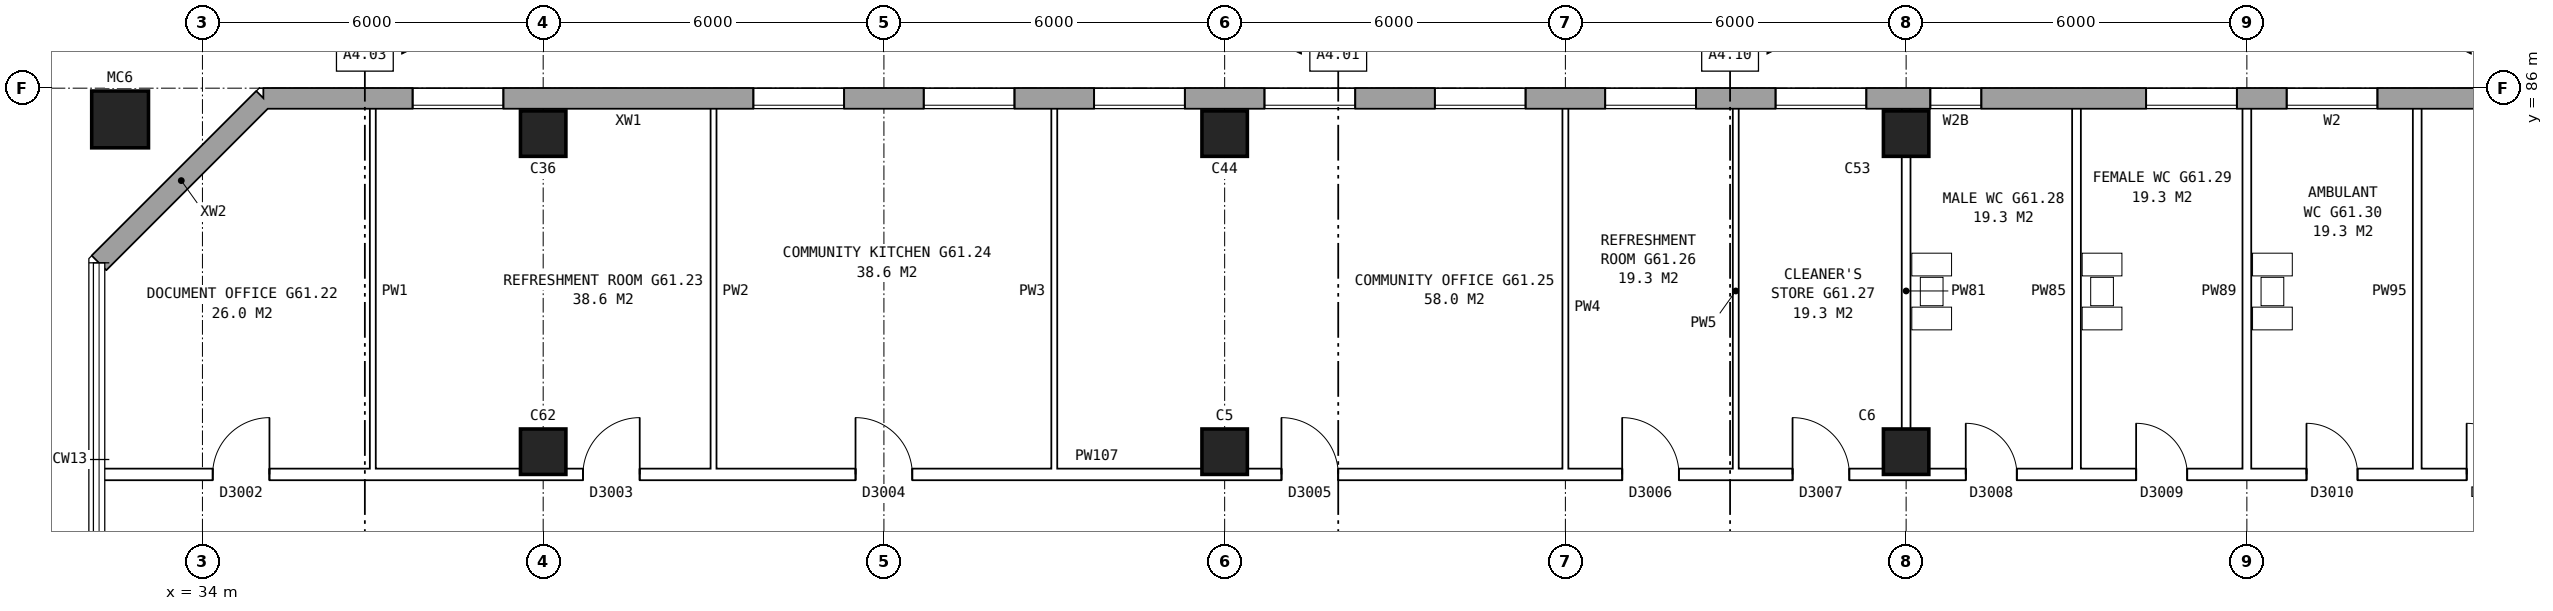
"""IFC4 building model, lengths in metres.
Left out: names, types, materials, properties, quantities, classifications, styles, units other than length and angle.
Written with IfcOpenShell. Run it as: python <this file> out.ifc"""

import sys

from ifc_helpers import new_model, si_unit, direction, frame, frame_2d, origin, origin_2d, place, context, subcontext, project, spatial, rectangle, hollow_rectangle, extrude, element, fill, save


model = new_model("IFC4")
c1 = context("Model", 3, precision=1e-05, world=origin(), true_north=direction((0.0, 1.0)))
c2 = subcontext(c1, "Body", "Model", "MODEL_VIEW")
j1 = project(units=[si_unit("LENGTHUNIT", "METRE"), si_unit("PLANEANGLEUNIT", "RADIAN")], contexts=[c1])
p1 = place(None, origin())
s1 = spatial("IfcSite", under=j1, at=p1, CompositionType="ELEMENT")
p2 = place(p1, origin())
s2 = spatial("IfcBuilding", under=s1, at=p2, CompositionType="ELEMENT")
p3 = place(p2, frame((0.0, 0.0, 215.2)))
s3 = spatial("IfcBuildingStorey", under=s2, at=p3, CompositionType="ELEMENT", Elevation=215.2)
for number, where, z_axis, x_axis in (
    (1, (40.0, 79.6, 0.0), (0.0, 0.0, 1.0), (1.0, 0.0, 0.0)),
    (2, (40.0, 85.2, 0.0), (0.0, 0.0, 1.0), (1.0, 0.0, 0.0)),
    (3, (52.0, 79.6, 0.0), (0.0, 0.0, 1.0), (1.0, 0.0, 0.0)),
    (4, (52.0, 85.2, 0.0), (0.0, 0.0, 1.0), (1.0, 0.0, 0.0)),
    (5, (64.0, 79.6, 0.0), (0.0, 0.0, 1.0), (1.0, 0.0, 0.0)),
    (6, (64.0, 85.2, 0.0), (0.0, 0.0, 1.0), (1.0, 0.0, 0.0)),
):
    element("IfcColumn", number, at=place(p3, frame(where, z_axis=z_axis, x_axis=x_axis)), inside=s3, PredefinedType="COLUMN", context=c2, shape_type="SweptSolid", body=[
        extrude(rectangle(XDim=0.8, YDim=0.8, at=origin_2d()), origin(), (0.0, 0.0, 1.0), 5.6),
    ])
p4 = place(p3, frame((32.55, 85.45, 0.0), z_axis=(0.0, 0.0, 1.0), x_axis=(1.0, 0.0, 0.0)))
e7 = element("IfcColumn", 7, at=p4, inside=s3, PredefinedType="COLUMN", context=c2, shape_type="SweptSolid", body=[
    extrude(hollow_rectangle(XDim=1.0, YDim=1.0, WallThickness=0.055, at=origin_2d()), origin(), (0.0, 0.0, 1.0), 6.2),
])
p5 = place(p3, frame((74.95, 85.82, 0.0), z_axis=(0.0, 0.0, 1.0), x_axis=(-1.0, 0.0, 0.0)))
e8 = element("IfcWall", 8, at=p5, inside=s3, PredefinedType="STANDARD", context=c2, shape_type="SweptSolid", body=[
    extrude(rectangle(XDim=39.875, YDim=0.36, at=frame_2d((19.938, 0.0))), origin(), (0.0, 0.0, 1.0), 5.6),
])
p6 = place(p5, frame((2.65, 0.0, 0.15)))
e9 = element("IfcOpeningElement", 9, at=p6, cuts=e8, PredefinedType="OPENING", context=c2, shape_type="SweptSolid", body=[
    extrude(rectangle(XDim=1.6, YDim=2.4, at=frame_2d((0.8, 1.2))), frame((0.0, 0.19, 0.0), z_axis=(0.0, -1.0, 0.0), x_axis=(1.0, 0.0, 0.0)), (0.0, 0.0, 1.0), 0.38),
])
p7 = place(p5, frame((5.125, 0.0, 0.15)))
e10 = element("IfcOpeningElement", 10, at=p7, cuts=e8, PredefinedType="OPENING", context=c2, shape_type="SweptSolid", body=[
    extrude(rectangle(XDim=1.6, YDim=2.4, at=frame_2d((0.8, 1.2))), frame((0.0, 0.19, 0.0), z_axis=(0.0, -1.0, 0.0), x_axis=(1.0, 0.0, 0.0)), (0.0, 0.0, 1.0), 0.38),
])
p8 = place(p5, frame((9.625, 0.0, 0.15)))
e11 = element("IfcOpeningElement", 11, at=p8, cuts=e8, PredefinedType="OPENING", context=c2, shape_type="SweptSolid", body=[
    extrude(rectangle(XDim=0.9, YDim=2.4, at=frame_2d((0.45, 1.2))), frame((0.0, 0.19, 0.0), z_axis=(0.0, -1.0, 0.0), x_axis=(1.0, 0.0, 0.0)), (0.0, 0.0, 1.0), 0.38),
])
p9 = place(p5, frame((11.65, 0.0, 0.15)))
e12 = element("IfcOpeningElement", 12, at=p9, cuts=e8, PredefinedType="OPENING", context=c2, shape_type="SweptSolid", body=[
    extrude(rectangle(XDim=1.6, YDim=2.4, at=frame_2d((0.8, 1.2))), frame((0.0, 0.19, 0.0), z_axis=(0.0, -1.0, 0.0), x_axis=(1.0, 0.0, 0.0)), (0.0, 0.0, 1.0), 0.38),
])
p10 = place(p5, frame((14.65, 0.0, 0.15)))
e13 = element("IfcOpeningElement", 13, at=p10, cuts=e8, PredefinedType="OPENING", context=c2, shape_type="SweptSolid", body=[
    extrude(rectangle(XDim=1.6, YDim=2.4, at=frame_2d((0.8, 1.2))), frame((0.0, 0.19, 0.0), z_axis=(0.0, -1.0, 0.0), x_axis=(1.0, 0.0, 0.0)), (0.0, 0.0, 1.0), 0.38),
])
p11 = place(p5, frame((17.65, 0.0, 0.15)))
e14 = element("IfcOpeningElement", 14, at=p11, cuts=e8, PredefinedType="OPENING", context=c2, shape_type="SweptSolid", body=[
    extrude(rectangle(XDim=1.6, YDim=2.4, at=frame_2d((0.8, 1.2))), frame((0.0, 0.19, 0.0), z_axis=(0.0, -1.0, 0.0), x_axis=(1.0, 0.0, 0.0)), (0.0, 0.0, 1.0), 0.38),
])
p12 = place(p5, frame((20.65, 0.0, 0.15)))
e15 = element("IfcOpeningElement", 15, at=p12, cuts=e8, PredefinedType="OPENING", context=c2, shape_type="SweptSolid", body=[
    extrude(rectangle(XDim=1.6, YDim=2.4, at=frame_2d((0.8, 1.2))), frame((0.0, 0.19, 0.0), z_axis=(0.0, -1.0, 0.0), x_axis=(1.0, 0.0, 0.0)), (0.0, 0.0, 1.0), 0.38),
])
p13 = place(p5, frame((23.65, 0.0, 0.15)))
e16 = element("IfcOpeningElement", 16, at=p13, cuts=e8, PredefinedType="OPENING", context=c2, shape_type="SweptSolid", body=[
    extrude(rectangle(XDim=1.6, YDim=2.4, at=frame_2d((0.8, 1.2))), frame((0.0, 0.19, 0.0), z_axis=(0.0, -1.0, 0.0), x_axis=(1.0, 0.0, 0.0)), (0.0, 0.0, 1.0), 0.38),
])
p14 = place(p5, frame((26.65, 0.0, 0.15)))
e17 = element("IfcOpeningElement", 17, at=p14, cuts=e8, PredefinedType="OPENING", context=c2, shape_type="SweptSolid", body=[
    extrude(rectangle(XDim=1.6, YDim=2.4, at=frame_2d((0.8, 1.2))), frame((0.0, 0.19, 0.0), z_axis=(0.0, -1.0, 0.0), x_axis=(1.0, 0.0, 0.0)), (0.0, 0.0, 1.0), 0.38),
])
p15 = place(p5, frame((29.65, 0.0, 0.15)))
e18 = element("IfcOpeningElement", 18, at=p15, cuts=e8, PredefinedType="OPENING", context=c2, shape_type="SweptSolid", body=[
    extrude(rectangle(XDim=1.6, YDim=2.4, at=frame_2d((0.8, 1.2))), frame((0.0, 0.19, 0.0), z_axis=(0.0, -1.0, 0.0), x_axis=(1.0, 0.0, 0.0)), (0.0, 0.0, 1.0), 0.38),
])
p16 = place(p5, frame((35.65, 0.0, 0.15)))
e19 = element("IfcOpeningElement", 19, at=p16, cuts=e8, PredefinedType="OPENING", context=c2, shape_type="SweptSolid", body=[
    extrude(rectangle(XDim=1.6, YDim=2.4, at=frame_2d((0.8, 1.2))), frame((0.0, 0.19, 0.0), z_axis=(0.0, -1.0, 0.0), x_axis=(1.0, 0.0, 0.0)), (0.0, 0.0, 1.0), 0.38),
])
p17 = place(p3, frame((35.075, 85.82, 0.0), z_axis=(0.0, 0.0, 1.0), x_axis=(-0.707106781187, -0.707106781187, 0.0)))
e20 = element("IfcWall", 20, at=p17, inside=s3, PredefinedType="STANDARD", context=c2, shape_type="SweptSolid", body=[
    extrude(rectangle(XDim=4.094, YDim=0.36, at=frame_2d((2.047, 0.0))), origin(), (0.0, 0.0, 1.0), 5.6),
])
p18 = place(p3, frame((32.24, 79.2, 0.0), z_axis=(0.0, 0.0, 1.0), x_axis=(1.0, 0.0, 0.0)))
e21 = element("IfcWall", 21, at=p18, inside=s3, PredefinedType="PARTITIONING", context=c2, shape_type="SweptSolid", body=[
    extrude(rectangle(XDim=43.5, YDim=0.2, at=frame_2d((21.75, 0.0))), origin(), (0.0, 0.0, 1.0), 5.6),
])
p19 = place(p18, frame((1.94, 0.0, 0.0)))
e22 = element("IfcOpeningElement", 22, at=p19, cuts=e21, PredefinedType="OPENING", context=c2, shape_type="SweptSolid", body=[
    extrude(rectangle(XDim=1.0, YDim=2.1, at=frame_2d((0.5, 1.05))), frame((0.0, 0.11, 0.0), z_axis=(0.0, -1.0, 0.0), x_axis=(1.0, 0.0, 0.0)), (0.0, 0.0, 1.0), 0.22),
])
p20 = place(p18, frame((8.46, 0.0, 0.0)))
e23 = element("IfcOpeningElement", 23, at=p20, cuts=e21, PredefinedType="OPENING", context=c2, shape_type="SweptSolid", body=[
    extrude(rectangle(XDim=1.0, YDim=2.1, at=frame_2d((0.5, 1.05))), frame((0.0, 0.11, 0.0), z_axis=(0.0, -1.0, 0.0), x_axis=(1.0, 0.0, 0.0)), (0.0, 0.0, 1.0), 0.22),
])
p21 = place(p18, frame((13.26, 0.0, 0.0)))
e24 = element("IfcOpeningElement", 24, at=p21, cuts=e21, PredefinedType="OPENING", context=c2, shape_type="SweptSolid", body=[
    extrude(rectangle(XDim=1.0, YDim=2.1, at=frame_2d((0.5, 1.05))), frame((0.0, 0.11, 0.0), z_axis=(0.0, -1.0, 0.0), x_axis=(1.0, 0.0, 0.0)), (0.0, 0.0, 1.0), 0.22),
])
p22 = place(p18, frame((20.76, 0.0, 0.0)))
e25 = element("IfcOpeningElement", 25, at=p22, cuts=e21, PredefinedType="OPENING", context=c2, shape_type="SweptSolid", body=[
    extrude(rectangle(XDim=1.0, YDim=2.1, at=frame_2d((0.5, 1.05))), frame((0.0, 0.11, 0.0), z_axis=(0.0, -1.0, 0.0), x_axis=(1.0, 0.0, 0.0)), (0.0, 0.0, 1.0), 0.22),
])
p23 = place(p18, frame((26.76, 0.0, 0.0)))
e26 = element("IfcOpeningElement", 26, at=p23, cuts=e21, PredefinedType="OPENING", context=c2, shape_type="SweptSolid", body=[
    extrude(rectangle(XDim=1.0, YDim=2.1, at=frame_2d((0.5, 1.05))), frame((0.0, 0.11, 0.0), z_axis=(0.0, -1.0, 0.0), x_axis=(1.0, 0.0, 0.0)), (0.0, 0.0, 1.0), 0.22),
])
p24 = place(p18, frame((29.76, 0.0, 0.0)))
e27 = element("IfcOpeningElement", 27, at=p24, cuts=e21, PredefinedType="OPENING", context=c2, shape_type="SweptSolid", body=[
    extrude(rectangle(XDim=1.0, YDim=2.1, at=frame_2d((0.5, 1.05))), frame((0.0, 0.11, 0.0), z_axis=(0.0, -1.0, 0.0), x_axis=(1.0, 0.0, 0.0)), (0.0, 0.0, 1.0), 0.22),
])
p25 = place(p18, frame((32.81, 0.0, 0.0)))
e28 = element("IfcOpeningElement", 28, at=p25, cuts=e21, PredefinedType="OPENING", context=c2, shape_type="SweptSolid", body=[
    extrude(rectangle(XDim=0.9, YDim=2.1, at=frame_2d((0.45, 1.05))), frame((0.0, 0.11, 0.0), z_axis=(0.0, -1.0, 0.0), x_axis=(1.0, 0.0, 0.0)), (0.0, 0.0, 1.0), 0.22),
])
p26 = place(p18, frame((35.81, 0.0, 0.0)))
e29 = element("IfcOpeningElement", 29, at=p26, cuts=e21, PredefinedType="OPENING", context=c2, shape_type="SweptSolid", body=[
    extrude(rectangle(XDim=0.9, YDim=2.1, at=frame_2d((0.45, 1.05))), frame((0.0, 0.11, 0.0), z_axis=(0.0, -1.0, 0.0), x_axis=(1.0, 0.0, 0.0)), (0.0, 0.0, 1.0), 0.22),
])
p27 = place(p18, frame((38.81, 0.0, 0.0)))
e30 = element("IfcOpeningElement", 30, at=p27, cuts=e21, PredefinedType="OPENING", context=c2, shape_type="SweptSolid", body=[
    extrude(rectangle(XDim=0.9, YDim=2.1, at=frame_2d((0.45, 1.05))), frame((0.0, 0.11, 0.0), z_axis=(0.0, -1.0, 0.0), x_axis=(1.0, 0.0, 0.0)), (0.0, 0.0, 1.0), 0.22),
])
p28 = place(p18, frame((41.63, 0.0, 0.0)))
e31 = element("IfcOpeningElement", 31, at=p28, cuts=e21, PredefinedType="OPENING", context=c2, shape_type="SweptSolid", body=[
    extrude(rectangle(XDim=0.9, YDim=2.1, at=frame_2d((0.45, 1.05))), frame((0.0, 0.11, 0.0), z_axis=(0.0, -1.0, 0.0), x_axis=(1.0, 0.0, 0.0)), (0.0, 0.0, 1.0), 0.22),
])
for number, where, z_axis, x_axis in (
    (32, (37.0, 79.1, 0.0), (0.0, 0.0, 1.0), (0.0, 1.0, 0.0)),
    (33, (43.0, 79.1, 0.0), (0.0, 0.0, 1.0), (0.0, 1.0, 0.0)),
    (34, (49.0, 79.1, 0.0), (0.0, 0.0, 1.0), (0.0, 1.0, 0.0)),
    (35, (58.0, 79.1, 0.0), (0.0, 0.0, 1.0), (0.0, 1.0, 0.0)),
    (36, (61.0, 79.1, 0.0), (0.0, 0.0, 1.0), (0.0, 1.0, 0.0)),
):
    element("IfcWall", number, at=place(p3, frame(where, z_axis=z_axis, x_axis=x_axis)), inside=s3, PredefinedType="PARTITIONING", context=c2, shape_type="SweptSolid", body=[
        extrude(rectangle(XDim=6.66, YDim=0.1, at=frame_2d((3.33, 0.0))), origin(), (0.0, 0.0, 1.0), 5.6),
    ])
for number, where, z_axis, x_axis in (
    (37, (64.0, 79.1, 0.0), (0.0, 0.0, 1.0), (0.0, 1.0, 0.0)),
    (38, (67.0, 79.1, 0.0), (0.0, 0.0, 1.0), (0.0, 1.0, 0.0)),
    (39, (70.0, 79.1, 0.0), (0.0, 0.0, 1.0), (0.0, 1.0, 0.0)),
    (40, (73.0, 79.1, 0.0), (0.0, 0.0, 1.0), (0.0, 1.0, 0.0)),
):
    element("IfcWall", number, at=place(p3, frame(where, z_axis=z_axis, x_axis=x_axis)), inside=s3, PredefinedType="PLUMBINGWALL", context=c2, shape_type="SweptSolid", body=[
        extrude(rectangle(XDim=6.66, YDim=0.15, at=frame_2d((3.33, 0.0))), origin(), (0.0, 0.0, 1.0), 5.6),
    ])
p29 = place(p6, origin())
e41 = element("IfcWindow", 41, at=p29, inside=s3, PartitioningType="SINGLE_PANEL", PredefinedType="WINDOW", context=c2, shape_type="SweptSolid", body=[
    extrude(rectangle(XDim=1.6, YDim=2.4, at=frame_2d((0.8, 1.2))), frame((0.0, 0.15, 0.0), z_axis=(0.0, -1.0, 0.0), x_axis=(1.0, 0.0, 0.0)), (0.0, 0.0, 1.0), 0.06),
])
fill(e9, e41)
p30 = place(p7, origin())
e42 = element("IfcWindow", 42, at=p30, inside=s3, PartitioningType="SINGLE_PANEL", PredefinedType="WINDOW", context=c2, shape_type="SweptSolid", body=[
    extrude(rectangle(XDim=1.6, YDim=2.4, at=frame_2d((0.8, 1.2))), frame((0.0, 0.15, 0.0), z_axis=(0.0, -1.0, 0.0), x_axis=(1.0, 0.0, 0.0)), (0.0, 0.0, 1.0), 0.06),
])
fill(e10, e42)
p31 = place(p8, origin())
e43 = element("IfcWindow", 43, at=p31, inside=s3, PartitioningType="SINGLE_PANEL", PredefinedType="WINDOW", context=c2, shape_type="SweptSolid", body=[
    extrude(rectangle(XDim=0.9, YDim=2.4, at=frame_2d((0.45, 1.2))), frame((0.0, 0.15, 0.0), z_axis=(0.0, -1.0, 0.0), x_axis=(1.0, 0.0, 0.0)), (0.0, 0.0, 1.0), 0.06),
])
fill(e11, e43)
p32 = place(p9, origin())
e44 = element("IfcWindow", 44, at=p32, inside=s3, PartitioningType="SINGLE_PANEL", PredefinedType="WINDOW", context=c2, shape_type="SweptSolid", body=[
    extrude(rectangle(XDim=1.6, YDim=2.4, at=frame_2d((0.8, 1.2))), frame((0.0, 0.15, 0.0), z_axis=(0.0, -1.0, 0.0), x_axis=(1.0, 0.0, 0.0)), (0.0, 0.0, 1.0), 0.06),
])
fill(e12, e44)
p33 = place(p10, origin())
e45 = element("IfcWindow", 45, at=p33, inside=s3, PartitioningType="SINGLE_PANEL", PredefinedType="WINDOW", context=c2, shape_type="SweptSolid", body=[
    extrude(rectangle(XDim=1.6, YDim=2.4, at=frame_2d((0.8, 1.2))), frame((0.0, 0.15, 0.0), z_axis=(0.0, -1.0, 0.0), x_axis=(1.0, 0.0, 0.0)), (0.0, 0.0, 1.0), 0.06),
])
fill(e13, e45)
p34 = place(p11, origin())
e46 = element("IfcWindow", 46, at=p34, inside=s3, PartitioningType="SINGLE_PANEL", PredefinedType="WINDOW", context=c2, shape_type="SweptSolid", body=[
    extrude(rectangle(XDim=1.6, YDim=2.4, at=frame_2d((0.8, 1.2))), frame((0.0, 0.15, 0.0), z_axis=(0.0, -1.0, 0.0), x_axis=(1.0, 0.0, 0.0)), (0.0, 0.0, 1.0), 0.06),
])
fill(e14, e46)
p35 = place(p12, origin())
e47 = element("IfcWindow", 47, at=p35, inside=s3, PartitioningType="SINGLE_PANEL", PredefinedType="WINDOW", context=c2, shape_type="SweptSolid", body=[
    extrude(rectangle(XDim=1.6, YDim=2.4, at=frame_2d((0.8, 1.2))), frame((0.0, 0.15, 0.0), z_axis=(0.0, -1.0, 0.0), x_axis=(1.0, 0.0, 0.0)), (0.0, 0.0, 1.0), 0.06),
])
fill(e15, e47)
p36 = place(p13, origin())
e48 = element("IfcWindow", 48, at=p36, inside=s3, PartitioningType="SINGLE_PANEL", PredefinedType="WINDOW", context=c2, shape_type="SweptSolid", body=[
    extrude(rectangle(XDim=1.6, YDim=2.4, at=frame_2d((0.8, 1.2))), frame((0.0, 0.15, 0.0), z_axis=(0.0, -1.0, 0.0), x_axis=(1.0, 0.0, 0.0)), (0.0, 0.0, 1.0), 0.06),
])
fill(e16, e48)
p37 = place(p14, origin())
e49 = element("IfcWindow", 49, at=p37, inside=s3, PartitioningType="SINGLE_PANEL", PredefinedType="WINDOW", context=c2, shape_type="SweptSolid", body=[
    extrude(rectangle(XDim=1.6, YDim=2.4, at=frame_2d((0.8, 1.2))), frame((0.0, 0.15, 0.0), z_axis=(0.0, -1.0, 0.0), x_axis=(1.0, 0.0, 0.0)), (0.0, 0.0, 1.0), 0.06),
])
fill(e17, e49)
p38 = place(p15, origin())
e50 = element("IfcWindow", 50, at=p38, inside=s3, PartitioningType="SINGLE_PANEL", PredefinedType="WINDOW", context=c2, shape_type="SweptSolid", body=[
    extrude(rectangle(XDim=1.6, YDim=2.4, at=frame_2d((0.8, 1.2))), frame((0.0, 0.15, 0.0), z_axis=(0.0, -1.0, 0.0), x_axis=(1.0, 0.0, 0.0)), (0.0, 0.0, 1.0), 0.06),
])
fill(e18, e50)
p39 = place(p16, origin())
e51 = element("IfcWindow", 51, at=p39, inside=s3, PartitioningType="SINGLE_PANEL", PredefinedType="WINDOW", context=c2, shape_type="SweptSolid", body=[
    extrude(rectangle(XDim=1.6, YDim=2.4, at=frame_2d((0.8, 1.2))), frame((0.0, 0.15, 0.0), z_axis=(0.0, -1.0, 0.0), x_axis=(1.0, 0.0, 0.0)), (0.0, 0.0, 1.0), 0.06),
])
fill(e19, e51)
p40 = place(p19, origin())
e52 = element("IfcDoor", 52, at=p40, inside=s3, OperationType="SINGLE_SWING_RIGHT", PredefinedType="DOOR", context=c2, shape_type="SweptSolid", body=[
    extrude(rectangle(XDim=1.0, YDim=2.1, at=frame_2d((0.5, 1.05))), frame((0.0, 0.025, 0.0), z_axis=(0.0, -1.0, 0.0), x_axis=(1.0, 0.0, 0.0)), (0.0, 0.0, 1.0), 0.05),
])
fill(e22, e52)
p41 = place(p20, origin())
e53 = element("IfcDoor", 53, at=p41, inside=s3, OperationType="SINGLE_SWING_RIGHT", PredefinedType="DOOR", context=c2, shape_type="SweptSolid", body=[
    extrude(rectangle(XDim=1.0, YDim=2.1, at=frame_2d((0.5, 1.05))), frame((0.0, 0.025, 0.0), z_axis=(0.0, -1.0, 0.0), x_axis=(1.0, 0.0, 0.0)), (0.0, 0.0, 1.0), 0.05),
])
fill(e23, e53)
p42 = place(p21, origin())
e54 = element("IfcDoor", 54, at=p42, inside=s3, OperationType="SINGLE_SWING_LEFT", PredefinedType="DOOR", context=c2, shape_type="SweptSolid", body=[
    extrude(rectangle(XDim=1.0, YDim=2.1, at=frame_2d((0.5, 1.05))), frame((0.0, 0.025, 0.0), z_axis=(0.0, -1.0, 0.0), x_axis=(1.0, 0.0, 0.0)), (0.0, 0.0, 1.0), 0.05),
])
fill(e24, e54)
p43 = place(p22, origin())
e55 = element("IfcDoor", 55, at=p43, inside=s3, OperationType="SINGLE_SWING_LEFT", PredefinedType="DOOR", context=c2, shape_type="SweptSolid", body=[
    extrude(rectangle(XDim=1.0, YDim=2.1, at=frame_2d((0.5, 1.05))), frame((0.0, 0.025, 0.0), z_axis=(0.0, -1.0, 0.0), x_axis=(1.0, 0.0, 0.0)), (0.0, 0.0, 1.0), 0.05),
])
fill(e25, e55)
p44 = place(p23, origin())
e56 = element("IfcDoor", 56, at=p44, inside=s3, OperationType="SINGLE_SWING_LEFT", PredefinedType="DOOR", context=c2, shape_type="SweptSolid", body=[
    extrude(rectangle(XDim=1.0, YDim=2.1, at=frame_2d((0.5, 1.05))), frame((0.0, 0.025, 0.0), z_axis=(0.0, -1.0, 0.0), x_axis=(1.0, 0.0, 0.0)), (0.0, 0.0, 1.0), 0.05),
])
fill(e26, e56)
p45 = place(p24, origin())
e57 = element("IfcDoor", 57, at=p45, inside=s3, OperationType="SINGLE_SWING_LEFT", PredefinedType="DOOR", context=c2, shape_type="SweptSolid", body=[
    extrude(rectangle(XDim=1.0, YDim=2.1, at=frame_2d((0.5, 1.05))), frame((0.0, 0.025, 0.0), z_axis=(0.0, -1.0, 0.0), x_axis=(1.0, 0.0, 0.0)), (0.0, 0.0, 1.0), 0.05),
])
fill(e27, e57)
p46 = place(p25, origin())
e58 = element("IfcDoor", 58, at=p46, inside=s3, OperationType="SINGLE_SWING_LEFT", PredefinedType="DOOR", context=c2, shape_type="SweptSolid", body=[
    extrude(rectangle(XDim=0.9, YDim=2.1, at=frame_2d((0.45, 1.05))), frame((0.0, 0.025, 0.0), z_axis=(0.0, -1.0, 0.0), x_axis=(1.0, 0.0, 0.0)), (0.0, 0.0, 1.0), 0.05),
])
fill(e28, e58)
p47 = place(p26, origin())
e59 = element("IfcDoor", 59, at=p47, inside=s3, OperationType="SINGLE_SWING_LEFT", PredefinedType="DOOR", context=c2, shape_type="SweptSolid", body=[
    extrude(rectangle(XDim=0.9, YDim=2.1, at=frame_2d((0.45, 1.05))), frame((0.0, 0.025, 0.0), z_axis=(0.0, -1.0, 0.0), x_axis=(1.0, 0.0, 0.0)), (0.0, 0.0, 1.0), 0.05),
])
fill(e29, e59)
p48 = place(p27, origin())
e60 = element("IfcDoor", 60, at=p48, inside=s3, OperationType="SINGLE_SWING_LEFT", PredefinedType="DOOR", context=c2, shape_type="SweptSolid", body=[
    extrude(rectangle(XDim=0.9, YDim=2.1, at=frame_2d((0.45, 1.05))), frame((0.0, 0.025, 0.0), z_axis=(0.0, -1.0, 0.0), x_axis=(1.0, 0.0, 0.0)), (0.0, 0.0, 1.0), 0.05),
])
fill(e30, e60)
p49 = place(p28, origin())
e61 = element("IfcDoor", 61, at=p49, inside=s3, OperationType="SINGLE_SWING_LEFT", PredefinedType="DOOR", context=c2, shape_type="SweptSolid", body=[
    extrude(rectangle(XDim=0.9, YDim=2.1, at=frame_2d((0.45, 1.05))), frame((0.0, 0.025, 0.0), z_axis=(0.0, -1.0, 0.0), x_axis=(1.0, 0.0, 0.0)), (0.0, 0.0, 1.0), 0.05),
])
fill(e31, e61)
save(model, sys.argv[1])
